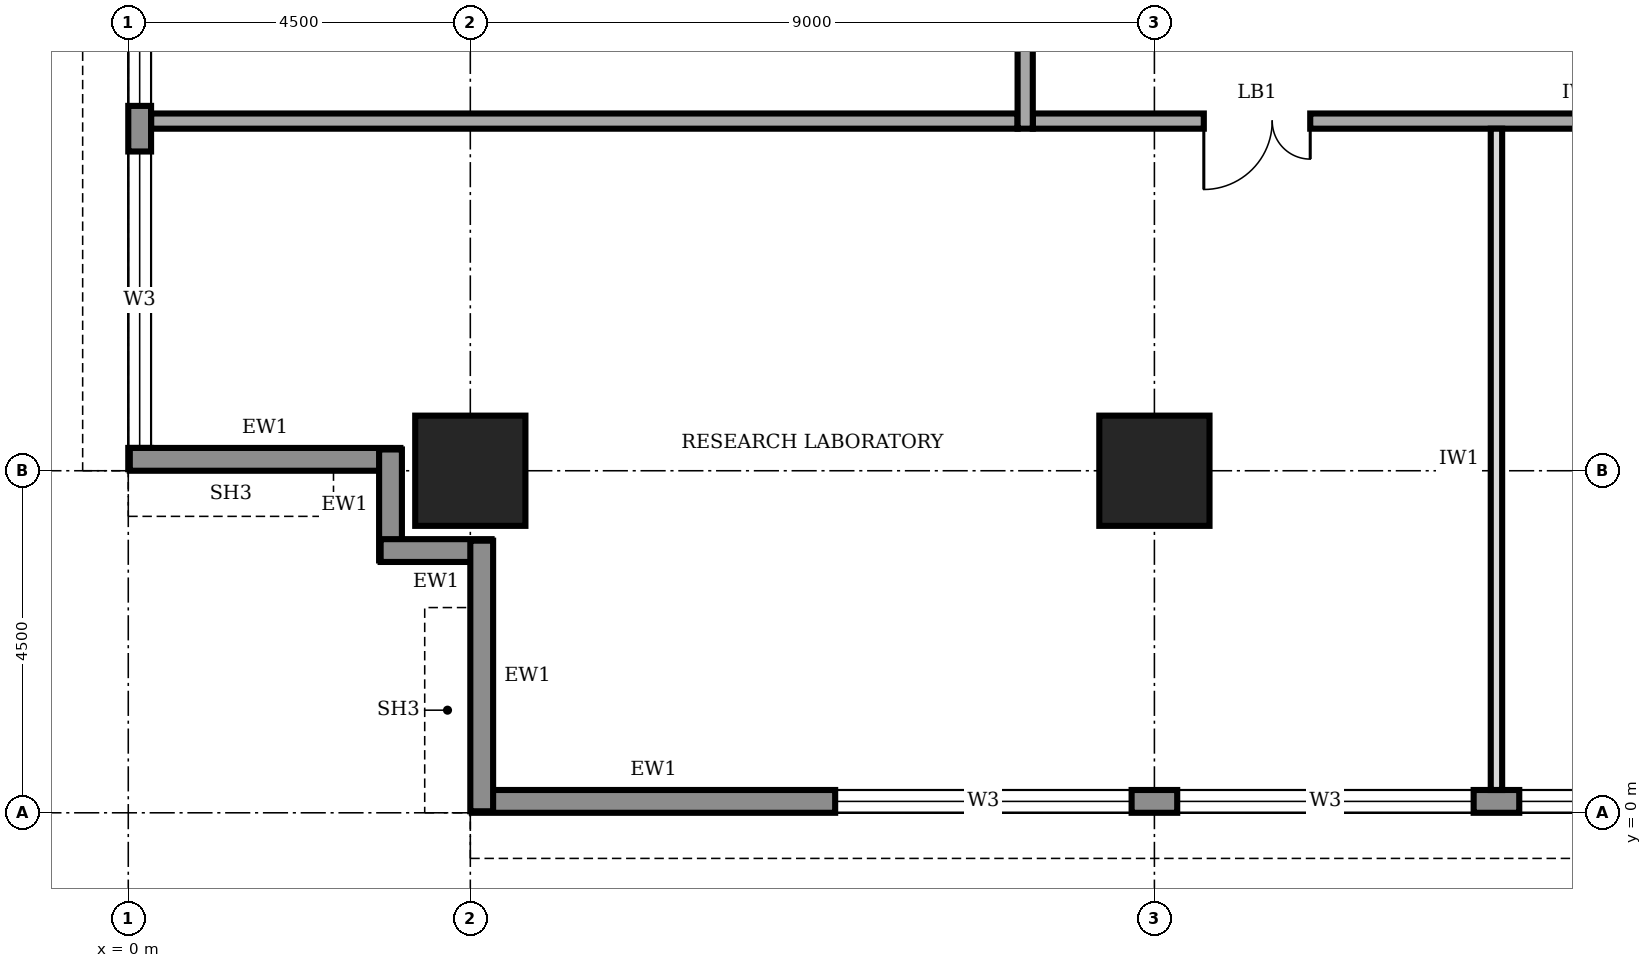
"""IFC4 building model, lengths in metres.
Left out: names, types, materials, properties, quantities, classifications, styles, units other than length and angle.
Written with IfcOpenShell. Run it as: python <this file> out.ifc"""

import sys

from ifc_helpers import new_model, si_unit, direction, frame, frame_2d, origin, origin_2d, place, context, subcontext, project, spatial, rectangle, extrude, element, fill, save


model = new_model("IFC4")
c1 = context("Model", 3, precision=1e-05, world=origin(), true_north=direction((0.0, 1.0)))
c2 = subcontext(c1, "Body", "Model", "MODEL_VIEW")
j1 = project(units=[si_unit("LENGTHUNIT", "METRE"), si_unit("PLANEANGLEUNIT", "RADIAN")], contexts=[c1])
p1 = place(None, origin())
s1 = spatial("IfcSite", under=j1, at=p1, CompositionType="ELEMENT")
p2 = place(p1, origin())
s2 = spatial("IfcBuilding", under=s1, at=p2, CompositionType="ELEMENT")
p3 = place(p2, frame((0.0, 0.0, 257.0)))
s3 = spatial("IfcBuildingStorey", under=s2, at=p3, CompositionType="ELEMENT", Elevation=257.0)
for number, where, z_axis, x_axis in (
    (1, (4.5, 4.5, 0.0), (0.0, 0.0, 1.0), (1.0, 0.0, 0.0)),
    (2, (13.5, 4.5, 0.0), (0.0, 0.0, 1.0), (1.0, 0.0, 0.0)),
):
    element("IfcColumn", number, at=place(p3, frame(where, z_axis=z_axis, x_axis=x_axis)), inside=s3, PredefinedType="COLUMN", context=c2, shape_type="SweptSolid", body=[
        extrude(rectangle(XDim=1.45, YDim=1.45, at=origin_2d()), origin(), (0.0, 0.0, 1.0), 4.0),
    ])
p4 = place(p3, frame((4.52, 0.15, 0.0), z_axis=(0.0, 0.0, 1.0), x_axis=(1.0, 0.0, 0.0)))
e3 = element("IfcWall", 3, at=p4, inside=s3, PredefinedType="STANDARD", context=c2, shape_type="SweptSolid", body=[
    extrude(rectangle(XDim=31.46, YDim=0.3, at=frame_2d((15.73, 0.0))), origin(), (0.0, 0.0, 1.0), 3.75),
])
p5 = place(p4, frame((4.78, 0.0, 0.95)))
e4 = element("IfcOpeningElement", 4, at=p5, cuts=e3, PredefinedType="OPENING", context=c2, shape_type="SweptSolid", body=[
    extrude(rectangle(XDim=3.9, YDim=1.8, at=frame_2d((1.95, 0.9))), frame((0.0, 0.16, 0.0), z_axis=(0.0, -1.0, 0.0), x_axis=(1.0, 0.0, 0.0)), (0.0, 0.0, 1.0), 0.32),
])
p6 = place(p4, frame((9.28, 0.0, 0.95)))
e5 = element("IfcOpeningElement", 5, at=p6, cuts=e3, PredefinedType="OPENING", context=c2, shape_type="SweptSolid", body=[
    extrude(rectangle(XDim=3.9, YDim=1.8, at=frame_2d((1.95, 0.9))), frame((0.0, 0.16, 0.0), z_axis=(0.0, -1.0, 0.0), x_axis=(1.0, 0.0, 0.0)), (0.0, 0.0, 1.0), 0.32),
])
p7 = place(p4, frame((13.78, 0.0, 0.95)))
e6 = element("IfcOpeningElement", 6, at=p7, cuts=e3, PredefinedType="OPENING", context=c2, shape_type="SweptSolid", body=[
    extrude(rectangle(XDim=3.9, YDim=1.8, at=frame_2d((1.95, 0.9))), frame((0.0, 0.16, 0.0), z_axis=(0.0, -1.0, 0.0), x_axis=(1.0, 0.0, 0.0)), (0.0, 0.0, 1.0), 0.32),
])
p8 = place(p4, frame((18.28, 0.0, 0.95)))
e7 = element("IfcOpeningElement", 7, at=p8, cuts=e3, PredefinedType="OPENING", context=c2, shape_type="SweptSolid", body=[
    extrude(rectangle(XDim=3.9, YDim=1.8, at=frame_2d((1.95, 0.9))), frame((0.0, 0.16, 0.0), z_axis=(0.0, -1.0, 0.0), x_axis=(1.0, 0.0, 0.0)), (0.0, 0.0, 1.0), 0.32),
])
p9 = place(p4, frame((22.78, 0.0, 0.95)))
e8 = element("IfcOpeningElement", 8, at=p9, cuts=e3, PredefinedType="OPENING", context=c2, shape_type="SweptSolid", body=[
    extrude(rectangle(XDim=3.9, YDim=1.8, at=frame_2d((1.95, 0.9))), frame((0.0, 0.16, 0.0), z_axis=(0.0, -1.0, 0.0), x_axis=(1.0, 0.0, 0.0)), (0.0, 0.0, 1.0), 0.32),
])
p10 = place(p4, frame((27.28, 0.0, 0.95)))
e9 = element("IfcOpeningElement", 9, at=p10, cuts=e3, PredefinedType="OPENING", context=c2, shape_type="SweptSolid", body=[
    extrude(rectangle(XDim=3.9, YDim=1.8, at=frame_2d((1.95, 0.9))), frame((0.0, 0.16, 0.0), z_axis=(0.0, -1.0, 0.0), x_axis=(1.0, 0.0, 0.0)), (0.0, 0.0, 1.0), 0.32),
])
p11 = place(p3, frame((0.15, 35.98, 0.0), z_axis=(0.0, 0.0, 1.0), x_axis=(0.0, -1.0, 0.0)))
e10 = element("IfcWall", 10, at=p11, inside=s3, PredefinedType="STANDARD", context=c2, shape_type="SweptSolid", body=[
    extrude(rectangle(XDim=31.46, YDim=0.3, at=frame_2d((15.73, 0.0))), origin(), (0.0, 0.0, 1.0), 3.75),
])
p12 = place(p11, frame((27.28, 0.0, 0.95)))
e11 = element("IfcOpeningElement", 11, at=p12, cuts=e10, PredefinedType="OPENING", context=c2, shape_type="SweptSolid", body=[
    extrude(rectangle(XDim=3.9, YDim=1.8, at=frame_2d((1.95, 0.9))), frame((0.0, 0.16, 0.0), z_axis=(0.0, -1.0, 0.0), x_axis=(1.0, 0.0, 0.0)), (0.0, 0.0, 1.0), 0.32),
])
p13 = place(p11, frame((22.78, 0.0, 0.95)))
e12 = element("IfcOpeningElement", 12, at=p13, cuts=e10, PredefinedType="OPENING", context=c2, shape_type="SweptSolid", body=[
    extrude(rectangle(XDim=3.9, YDim=1.8, at=frame_2d((1.95, 0.9))), frame((0.0, 0.16, 0.0), z_axis=(0.0, -1.0, 0.0), x_axis=(1.0, 0.0, 0.0)), (0.0, 0.0, 1.0), 0.32),
])
p14 = place(p11, frame((18.28, 0.0, 0.95)))
e13 = element("IfcOpeningElement", 13, at=p14, cuts=e10, PredefinedType="OPENING", context=c2, shape_type="SweptSolid", body=[
    extrude(rectangle(XDim=3.9, YDim=1.8, at=frame_2d((1.95, 0.9))), frame((0.0, 0.16, 0.0), z_axis=(0.0, -1.0, 0.0), x_axis=(1.0, 0.0, 0.0)), (0.0, 0.0, 1.0), 0.32),
])
p15 = place(p11, frame((13.78, 0.0, 0.95)))
e14 = element("IfcOpeningElement", 14, at=p15, cuts=e10, PredefinedType="OPENING", context=c2, shape_type="SweptSolid", body=[
    extrude(rectangle(XDim=3.9, YDim=1.8, at=frame_2d((1.95, 0.9))), frame((0.0, 0.16, 0.0), z_axis=(0.0, -1.0, 0.0), x_axis=(1.0, 0.0, 0.0)), (0.0, 0.0, 1.0), 0.32),
])
p16 = place(p11, frame((9.28, 0.0, 0.95)))
e15 = element("IfcOpeningElement", 15, at=p16, cuts=e10, PredefinedType="OPENING", context=c2, shape_type="SweptSolid", body=[
    extrude(rectangle(XDim=3.9, YDim=1.8, at=frame_2d((1.95, 0.9))), frame((0.0, 0.16, 0.0), z_axis=(0.0, -1.0, 0.0), x_axis=(1.0, 0.0, 0.0)), (0.0, 0.0, 1.0), 0.32),
])
p17 = place(p11, frame((4.78, 0.0, 0.95)))
e16 = element("IfcOpeningElement", 16, at=p17, cuts=e10, PredefinedType="OPENING", context=c2, shape_type="SweptSolid", body=[
    extrude(rectangle(XDim=3.9, YDim=1.8, at=frame_2d((1.95, 0.9))), frame((0.0, 0.16, 0.0), z_axis=(0.0, -1.0, 0.0), x_axis=(1.0, 0.0, 0.0)), (0.0, 0.0, 1.0), 0.32),
])
p18 = place(p3, frame((0.02, 4.65, 0.0), z_axis=(0.0, 0.0, 1.0), x_axis=(1.0, 0.0, 0.0)))
e17 = element("IfcWall", 17, at=p18, inside=s3, PredefinedType="STANDARD", context=c2, shape_type="SweptSolid", body=[
    extrude(rectangle(XDim=3.56, YDim=0.3, at=frame_2d((1.78, 0.0))), origin(), (0.0, 0.0, 1.0), 2.85),
])
for number, where, z_axis, x_axis in (
    (18, (3.45, 4.78, 0.0), (0.0, 0.0, 1.0), (0.0, -1.0, 0.0)),
    (19, (3.32, 3.45, 0.0), (0.0, 0.0, 1.0), (1.0, 0.0, 0.0)),
):
    element("IfcWall", number, at=place(p3, frame(where, z_axis=z_axis, x_axis=x_axis)), inside=s3, PredefinedType="STANDARD", context=c2, shape_type="SweptSolid", body=[
        extrude(rectangle(XDim=1.46, YDim=0.3, at=frame_2d((0.73, 0.0))), origin(), (0.0, 0.0, 1.0), 3.75),
    ])
p19 = place(p3, frame((4.65, 3.58, 0.0), z_axis=(0.0, 0.0, 1.0), x_axis=(0.0, -1.0, 0.0)))
e20 = element("IfcWall", 20, at=p19, inside=s3, PredefinedType="STANDARD", context=c2, shape_type="SweptSolid", body=[
    extrude(rectangle(XDim=3.56, YDim=0.3, at=frame_2d((1.78, 0.0))), origin(), (0.0, 0.0, 1.0), 2.85),
])
p20 = place(p3, frame((11.9, 9.1, 0.0), z_axis=(0.0, 0.0, 1.0), x_axis=(1.0, 0.0, 0.0)))
e21 = element("IfcWall", 21, at=p20, inside=s3, PredefinedType="SOLIDWALL", context=c2, shape_type="SweptSolid", body=[
    extrude(rectangle(XDim=16.9, YDim=0.2, at=frame_2d((8.45, 0.0))), origin(), (0.0, 0.0, 1.0), 3.75),
])
p21 = place(p20, frame((2.25, 0.0, 0.0)))
e22 = element("IfcOpeningElement", 22, at=p21, cuts=e21, PredefinedType="OPENING", context=c2, shape_type="SweptSolid", body=[
    extrude(rectangle(XDim=1.4, YDim=2.1, at=frame_2d((0.7, 1.05))), frame((0.0, 0.11, 0.0), z_axis=(0.0, -1.0, 0.0), x_axis=(1.0, 0.0, 0.0)), (0.0, 0.0, 1.0), 0.22),
])
p22 = place(p20, frame((10.8, 0.0, 0.0)))
e23 = element("IfcOpeningElement", 23, at=p22, cuts=e21, PredefinedType="OPENING", context=c2, shape_type="SweptSolid", body=[
    extrude(rectangle(XDim=1.4, YDim=2.1, at=frame_2d((0.7, 1.05))), frame((0.0, 0.11, 0.0), z_axis=(0.0, -1.0, 0.0), x_axis=(1.0, 0.0, 0.0)), (0.0, 0.0, 1.0), 0.22),
])
p23 = place(p3, frame((11.8, 31.3, 0.0), z_axis=(0.0, 0.0, 1.0), x_axis=(0.0, -1.0, 0.0)))
e24 = element("IfcWall", 24, at=p23, inside=s3, PredefinedType="SOLIDWALL", context=c2, shape_type="SweptSolid", body=[
    extrude(rectangle(XDim=22.3, YDim=0.2, at=frame_2d((11.15, 0.0))), origin(), (0.0, 0.0, 1.0), 3.75),
])
p24 = place(p23, frame((19.55, 0.0, 0.0)))
e25 = element("IfcOpeningElement", 25, at=p24, cuts=e24, PredefinedType="OPENING", context=c2, shape_type="SweptSolid", body=[
    extrude(rectangle(XDim=1.0, YDim=2.1, at=frame_2d((0.5, 1.05))), frame((0.0, 0.11, 0.0), z_axis=(0.0, -1.0, 0.0), x_axis=(1.0, 0.0, 0.0)), (0.0, 0.0, 1.0), 0.22),
])
p25 = place(p23, frame((15.65, 0.0, 0.0)))
e26 = element("IfcOpeningElement", 26, at=p25, cuts=e24, PredefinedType="OPENING", context=c2, shape_type="SweptSolid", body=[
    extrude(rectangle(XDim=0.9, YDim=2.1, at=frame_2d((0.45, 1.05))), frame((0.0, 0.11, 0.0), z_axis=(0.0, -1.0, 0.0), x_axis=(1.0, 0.0, 0.0)), (0.0, 0.0, 1.0), 0.22),
])
p26 = place(p23, frame((10.85, 0.0, 0.0)))
e27 = element("IfcOpeningElement", 27, at=p26, cuts=e24, PredefinedType="OPENING", context=c2, shape_type="SweptSolid", body=[
    extrude(rectangle(XDim=0.9, YDim=2.1, at=frame_2d((0.45, 1.05))), frame((0.0, 0.11, 0.0), z_axis=(0.0, -1.0, 0.0), x_axis=(1.0, 0.0, 0.0)), (0.0, 0.0, 1.0), 0.22),
])
p27 = place(p23, frame((7.8, 0.0, 0.0)))
e28 = element("IfcOpeningElement", 28, at=p27, cuts=e24, PredefinedType="OPENING", context=c2, shape_type="SweptSolid", body=[
    extrude(rectangle(XDim=0.9, YDim=2.1, at=frame_2d((0.45, 1.05))), frame((0.0, 0.11, 0.0), z_axis=(0.0, -1.0, 0.0), x_axis=(1.0, 0.0, 0.0)), (0.0, 0.0, 1.0), 0.22),
])
p28 = place(p23, frame((4.8, 0.0, 0.0)))
e29 = element("IfcOpeningElement", 29, at=p28, cuts=e24, PredefinedType="OPENING", context=c2, shape_type="SweptSolid", body=[
    extrude(rectangle(XDim=1.0, YDim=2.1, at=frame_2d((0.5, 1.05))), frame((0.0, 0.11, 0.0), z_axis=(0.0, -1.0, 0.0), x_axis=(1.0, 0.0, 0.0)), (0.0, 0.0, 1.0), 0.22),
])
p29 = place(p23, frame((12.9, 0.0, 0.0)))
e30 = element("IfcOpeningElement", 30, at=p29, cuts=e24, PredefinedType="OPENING", context=c2, shape_type="SweptSolid", body=[
    extrude(rectangle(XDim=1.0, YDim=2.1, at=frame_2d((0.5, 1.05))), frame((0.0, 0.11, 0.0), z_axis=(0.0, -1.0, 0.0), x_axis=(1.0, 0.0, 0.0)), (0.0, 0.0, 1.0), 0.22),
])
p30 = place(p23, frame((1.55, 0.0, 0.0)))
e31 = element("IfcOpeningElement", 31, at=p30, cuts=e24, PredefinedType="OPENING", context=c2, shape_type="SweptSolid", body=[
    extrude(rectangle(XDim=1.0, YDim=2.1, at=frame_2d((0.5, 1.05))), frame((0.0, 0.11, 0.0), z_axis=(0.0, -1.0, 0.0), x_axis=(1.0, 0.0, 0.0)), (0.0, 0.0, 1.0), 0.22),
])
p31 = place(p3, frame((0.3, 9.1, 0.0), z_axis=(0.0, 0.0, 1.0), x_axis=(1.0, 0.0, 0.0)))
e32 = element("IfcWall", 32, at=p31, inside=s3, PredefinedType="SOLIDWALL", context=c2, shape_type="SweptSolid", body=[
    extrude(rectangle(XDim=11.4, YDim=0.2, at=frame_2d((5.7, 0.0))), origin(), (0.0, 0.0, 1.0), 3.75),
])
p32 = place(p3, frame((18.0, 0.3, 0.0), z_axis=(0.0, 0.0, 1.0), x_axis=(0.0, 1.0, 0.0)))
e33 = element("IfcWall", 33, at=p32, inside=s3, PredefinedType="PARTITIONING", context=c2, shape_type="SweptSolid", body=[
    extrude(rectangle(XDim=8.7, YDim=0.15, at=frame_2d((4.35, 0.0))), origin(), (0.0, 0.0, 1.0), 3.75),
])
p33 = place(p5, origin())
e34 = element("IfcWindow", 34, at=p33, inside=s3, PartitioningType="SINGLE_PANEL", PredefinedType="WINDOW", context=c2, shape_type="SweptSolid", body=[
    extrude(rectangle(XDim=3.9, YDim=1.8, at=frame_2d((1.95, 0.9))), frame((0.0, 0.03, 0.0), z_axis=(0.0, -1.0, 0.0), x_axis=(1.0, 0.0, 0.0)), (0.0, 0.0, 1.0), 0.06),
])
fill(e4, e34)
p34 = place(p6, origin())
e35 = element("IfcWindow", 35, at=p34, inside=s3, PartitioningType="SINGLE_PANEL", PredefinedType="WINDOW", context=c2, shape_type="SweptSolid", body=[
    extrude(rectangle(XDim=3.9, YDim=1.8, at=frame_2d((1.95, 0.9))), frame((0.0, 0.03, 0.0), z_axis=(0.0, -1.0, 0.0), x_axis=(1.0, 0.0, 0.0)), (0.0, 0.0, 1.0), 0.06),
])
fill(e5, e35)
p35 = place(p7, origin())
e36 = element("IfcWindow", 36, at=p35, inside=s3, PartitioningType="SINGLE_PANEL", PredefinedType="WINDOW", context=c2, shape_type="SweptSolid", body=[
    extrude(rectangle(XDim=3.9, YDim=1.8, at=frame_2d((1.95, 0.9))), frame((0.0, 0.03, 0.0), z_axis=(0.0, -1.0, 0.0), x_axis=(1.0, 0.0, 0.0)), (0.0, 0.0, 1.0), 0.06),
])
fill(e6, e36)
p36 = place(p12, origin())
e37 = element("IfcWindow", 37, at=p36, inside=s3, PartitioningType="SINGLE_PANEL", PredefinedType="WINDOW", context=c2, shape_type="SweptSolid", body=[
    extrude(rectangle(XDim=3.9, YDim=1.8, at=frame_2d((1.95, 0.9))), frame((0.0, 0.03, 0.0), z_axis=(0.0, -1.0, 0.0), x_axis=(1.0, 0.0, 0.0)), (0.0, 0.0, 1.0), 0.06),
])
fill(e11, e37)
p37 = place(p13, origin())
e38 = element("IfcWindow", 38, at=p37, inside=s3, PartitioningType="SINGLE_PANEL", PredefinedType="WINDOW", context=c2, shape_type="SweptSolid", body=[
    extrude(rectangle(XDim=3.9, YDim=1.8, at=frame_2d((1.95, 0.9))), frame((0.0, 0.03, 0.0), z_axis=(0.0, -1.0, 0.0), x_axis=(1.0, 0.0, 0.0)), (0.0, 0.0, 1.0), 0.06),
])
fill(e12, e38)
p38 = place(p21, frame((1.4, 0.0, 0.0), z_axis=(0.0, 0.0, 1.0), x_axis=(-1.0, 0.0, 0.0)))
e39 = element("IfcDoor", 39, at=p38, inside=s3, OperationType="DOUBLE_DOOR_SINGLE_SWING", PredefinedType="DOOR", context=c2, shape_type="SweptSolid", body=[
    extrude(rectangle(XDim=1.4, YDim=2.1, at=frame_2d((0.7, 1.05))), frame((0.0, 0.025, 0.0), z_axis=(0.0, -1.0, 0.0), x_axis=(1.0, 0.0, 0.0)), (0.0, 0.0, 1.0), 0.05),
])
fill(e22, e39)
save(model, sys.argv[1])
